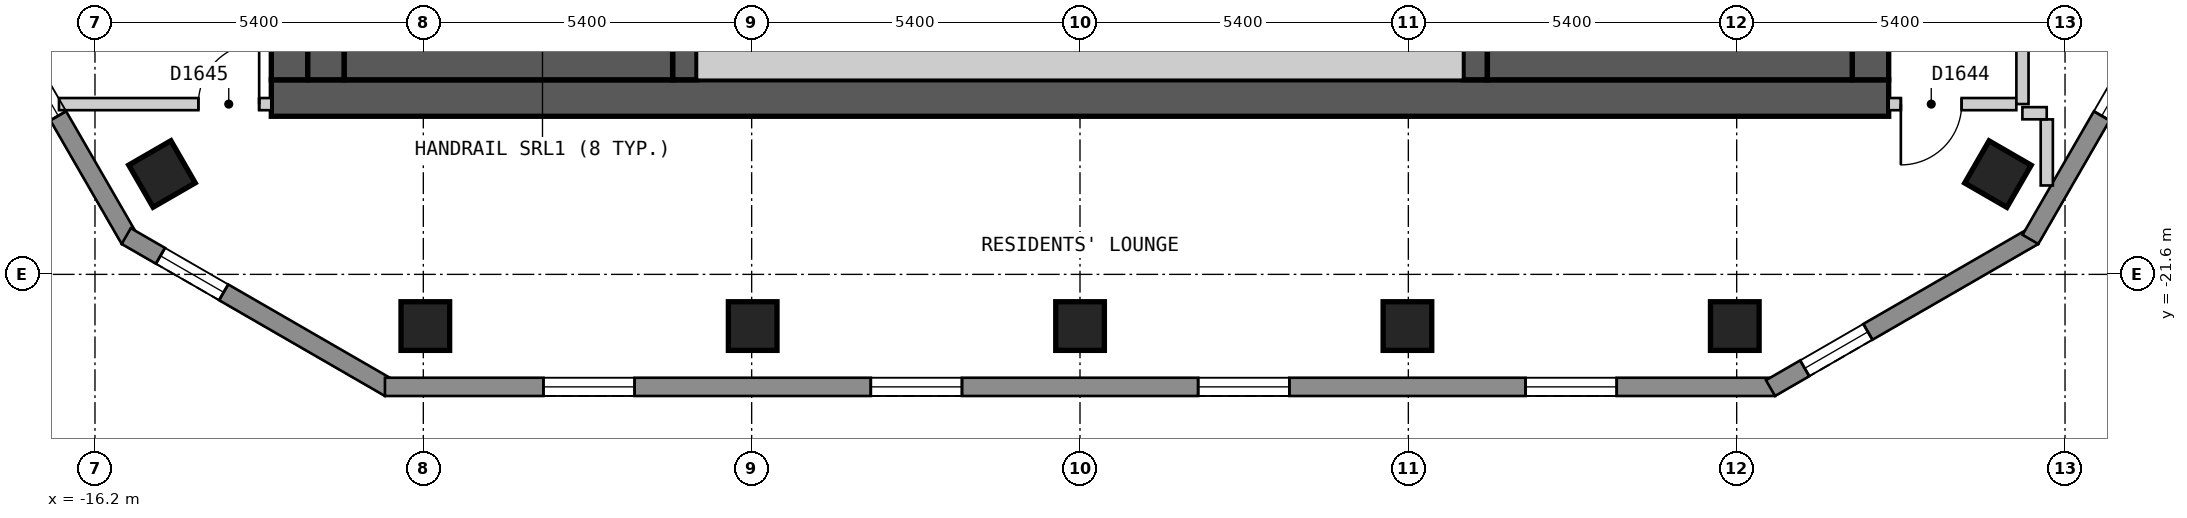
"""IFC4 building model, lengths in metres.
Left out: names, types, materials, properties, quantities, classifications, styles, units other than length and angle.
Written with IfcOpenShell. Run it as: python <this file> out.ifc"""

import sys

from ifc_helpers import new_model, si_unit, direction, frame, frame_2d, origin, origin_2d, place, context, subcontext, project, spatial, polyline, rectangle, outline, extrude, element, fill, save


model = new_model("IFC4")
c1 = context("Model", 3, precision=1e-05, world=origin(), true_north=direction((0.0, 1.0)))
c2 = subcontext(c1, "Body", "Model", "MODEL_VIEW")
j1 = project(units=[si_unit("LENGTHUNIT", "METRE"), si_unit("PLANEANGLEUNIT", "RADIAN")], contexts=[c1])
p1 = place(None, origin())
s1 = spatial("IfcSite", under=j1, at=p1, CompositionType="ELEMENT")
p2 = place(p1, origin())
s2 = spatial("IfcBuilding", under=s1, at=p2, CompositionType="ELEMENT")
p3 = place(p2, frame((0.0, 0.0, 169.2)))
s3 = spatial("IfcBuildingStorey", under=s2, at=p3, CompositionType="ELEMENT", Elevation=169.2)
for number, where, z_axis, x_axis in (
    (1, (-15.098, -19.949, 0.0), (0.0, 0.0, 1.0), (0.5, -0.866, 0.0)),
    (2, (-10.767, -22.45, 0.0), (0.0, 0.0, 1.0), (1.0, 0.0, 0.0)),
    (3, (-5.383, -22.45, 0.0), (0.0, 0.0, 1.0), (1.0, 0.0, 0.0)),
    (4, (0.001, -22.45, 0.0), (0.0, 0.0, 1.0), (1.0, 0.0, 0.0)),
    (5, (5.385, -22.45, 0.0), (0.0, 0.0, 1.0), (1.0, 0.0, 0.0)),
    (6, (10.769, -22.45, 0.0), (0.0, 0.0, 1.0), (1.0, 0.0, 0.0)),
    (7, (15.097, -19.951, 0.0), (0.0, 0.0, 1.0), (0.5, 0.866, 0.0)),
):
    element("IfcColumn", number, at=place(p3, frame(where, z_axis=z_axis, x_axis=x_axis)), inside=s3, PredefinedType="COLUMN", context=c2, shape_type="SweptSolid", body=[
        extrude(rectangle(XDim=0.8, YDim=0.8, at=origin_2d()), origin(), (0.0, 0.0, 1.0), 3.0),
    ])
p4 = place(p3, frame((-13.3, -18.7, 0.0), z_axis=(0.0, 0.0, 1.0), x_axis=(1.0, 0.0, 0.0)))
e8 = element("IfcWall", 8, at=p4, inside=s3, PredefinedType="SHEAR", context=c2, shape_type="SweptSolid", body=[
    extrude(rectangle(XDim=26.6, YDim=0.6, at=frame_2d((13.3, 0.0))), origin(), (0.0, 0.0, 1.0), 2.7),
])
p5 = place(p3, frame((-13.0, -18.4, 0.0), z_axis=(0.0, 0.0, 1.0), x_axis=(0.0, 1.0, 0.0)))
e9 = element("IfcWall", 9, at=p5, inside=s3, PredefinedType="SHEAR", context=c2, shape_type="SweptSolid", body=[
    extrude(rectangle(XDim=12.8, YDim=0.6, at=frame_2d((6.4, 0.0))), origin(), (0.0, 0.0, 1.0), 2.7),
])
p6 = place(p5, frame((4.2, 0.0, 0.0)))
e10 = element("IfcOpeningElement", 10, at=p6, cuts=e9, PredefinedType="OPENING", context=c2, shape_type="SweptSolid", body=[
    extrude(rectangle(XDim=1.2, YDim=2.1, at=frame_2d((0.6, 1.05))), frame((0.0, 0.31, 0.0), z_axis=(0.0, -1.0, 0.0), x_axis=(1.0, 0.0, 0.0)), (0.0, 0.0, 1.0), 0.62),
])
p7 = place(p3, frame((13.0, -18.4, 0.0), z_axis=(0.0, 0.0, 1.0), x_axis=(0.0, 1.0, 0.0)))
e11 = element("IfcWall", 11, at=p7, inside=s3, PredefinedType="SHEAR", context=c2, shape_type="SweptSolid", body=[
    extrude(rectangle(XDim=12.8, YDim=0.6, at=frame_2d((6.4, 0.0))), origin(), (0.0, 0.0, 1.0), 2.7),
])
for number, where, z_axis, x_axis in (
    (12, (-6.5, -18.4, 0.0), (0.0, 0.0, 1.0), (0.0, 1.0, 0.0)),
    (13, (6.5, -18.4, 0.0), (0.0, 0.0, 1.0), (0.0, 1.0, 0.0)),
):
    element("IfcWall", number, at=place(p3, frame(where, z_axis=z_axis, x_axis=x_axis)), inside=s3, PredefinedType="SHEAR", context=c2, shape_type="SweptSolid", body=[
        extrude(rectangle(XDim=3.55, YDim=0.4, at=frame_2d((1.775, 0.0))), origin(), (0.0, 0.0, 1.0), 2.7),
    ])
p8 = place(p3, frame((-26.024, -3.025, 0.0), z_axis=(0.0, 0.0, 1.0), x_axis=(0.500018670445, -0.86601462413, 0.0)))
e14 = element("IfcWall", 14, at=p8, inside=s3, PredefinedType="SOLIDWALL", context=c2, shape_type="SweptSolid", body=[
    extrude(outline(polyline([(0.0, -0.15), (20.785, -0.15), (20.705, 0.15), (0.08, 0.15), (0.0, -0.15)])), origin(), (0.0, 0.0, 1.0), 2.7),
])
p9 = place(p8, frame((2.346, 0.0, 0.15)))
e15 = element("IfcOpeningElement", 15, at=p9, cuts=e14, PredefinedType="OPENING", context=c2, shape_type="SweptSolid", body=[
    extrude(rectangle(XDim=1.5, YDim=2.1, at=frame_2d((0.75, 1.05))), frame((0.0, 0.16, 0.0), z_axis=(0.0, -1.0, 0.0), x_axis=(1.0, 0.0, 0.0)), (0.0, 0.0, 1.0), 0.32),
])
p10 = place(p8, frame((7.21, 0.0, 0.15)))
e16 = element("IfcOpeningElement", 16, at=p10, cuts=e14, PredefinedType="OPENING", context=c2, shape_type="SweptSolid", body=[
    extrude(rectangle(XDim=1.5, YDim=2.1, at=frame_2d((0.75, 1.05))), frame((0.0, 0.16, 0.0), z_axis=(0.0, -1.0, 0.0), x_axis=(1.0, 0.0, 0.0)), (0.0, 0.0, 1.0), 0.32),
])
p11 = place(p8, frame((12.073, 0.0, 0.15)))
e17 = element("IfcOpeningElement", 17, at=p11, cuts=e14, PredefinedType="OPENING", context=c2, shape_type="SweptSolid", body=[
    extrude(rectangle(XDim=1.5, YDim=2.1, at=frame_2d((0.75, 1.05))), frame((0.0, 0.16, 0.0), z_axis=(0.0, -1.0, 0.0), x_axis=(1.0, 0.0, 0.0)), (0.0, 0.0, 1.0), 0.32),
])
p12 = place(p8, frame((16.938, 0.0, 0.15)))
e18 = element("IfcOpeningElement", 18, at=p12, cuts=e14, PredefinedType="OPENING", context=c2, shape_type="SweptSolid", body=[
    extrude(rectangle(XDim=1.5, YDim=2.1, at=frame_2d((0.75, 1.05))), frame((0.0, 0.16, 0.0), z_axis=(0.0, -1.0, 0.0), x_axis=(1.0, 0.0, 0.0)), (0.0, 0.0, 1.0), 0.32),
])
p13 = place(p3, frame((-15.686, -20.97, 0.0), z_axis=(0.0, 0.0, 1.0), x_axis=(0.866022959057, -0.500004234368, 0.0)))
e19 = element("IfcWall", 19, at=p13, inside=s3, PredefinedType="SOLIDWALL", context=c2, shape_type="SweptSolid", body=[
    extrude(outline(polyline([(0.0, -0.15), (5.0, -0.15), (4.92, 0.15), (0.08, 0.15), (0.0, -0.15)])), origin(), (0.0, 0.0, 1.0), 2.7),
])
p14 = place(p13, frame((0.65, 0.0, 0.15)))
e20 = element("IfcOpeningElement", 20, at=p14, cuts=e19, PredefinedType="OPENING", context=c2, shape_type="SweptSolid", body=[
    extrude(rectangle(XDim=1.2, YDim=2.1, at=frame_2d((0.6, 1.05))), frame((0.0, 0.16, 0.0), z_axis=(0.0, -1.0, 0.0), x_axis=(1.0, 0.0, 0.0)), (0.0, 0.0, 1.0), 0.32),
])
p15 = place(p3, frame((-11.431, -23.45, 0.0), z_axis=(0.0, 0.0, 1.0), x_axis=(1.0, 0.0, 0.0)))
e21 = element("IfcWall", 21, at=p15, inside=s3, PredefinedType="SOLIDWALL", context=c2, shape_type="SweptSolid", body=[
    extrude(outline(polyline([(0.0, -0.15), (22.862, -0.15), (22.781, 0.15), (0.08, 0.15), (0.0, -0.15)])), origin(), (0.0, 0.0, 1.0), 2.7),
])
p16 = place(p15, frame((2.606, 0.0, 0.15)))
e22 = element("IfcOpeningElement", 22, at=p16, cuts=e21, PredefinedType="OPENING", context=c2, shape_type="SweptSolid", body=[
    extrude(rectangle(XDim=1.5, YDim=2.1, at=frame_2d((0.75, 1.05))), frame((0.0, 0.16, 0.0), z_axis=(0.0, -1.0, 0.0), x_axis=(1.0, 0.0, 0.0)), (0.0, 0.0, 1.0), 0.32),
])
p17 = place(p15, frame((7.99, 0.0, 0.15)))
e23 = element("IfcOpeningElement", 23, at=p17, cuts=e21, PredefinedType="OPENING", context=c2, shape_type="SweptSolid", body=[
    extrude(rectangle(XDim=1.5, YDim=2.1, at=frame_2d((0.75, 1.05))), frame((0.0, 0.16, 0.0), z_axis=(0.0, -1.0, 0.0), x_axis=(1.0, 0.0, 0.0)), (0.0, 0.0, 1.0), 0.32),
])
p18 = place(p15, frame((13.374, 0.0, 0.15)))
e24 = element("IfcOpeningElement", 24, at=p18, cuts=e21, PredefinedType="OPENING", context=c2, shape_type="SweptSolid", body=[
    extrude(rectangle(XDim=1.5, YDim=2.1, at=frame_2d((0.75, 1.05))), frame((0.0, 0.16, 0.0), z_axis=(0.0, -1.0, 0.0), x_axis=(1.0, 0.0, 0.0)), (0.0, 0.0, 1.0), 0.32),
])
p19 = place(p15, frame((18.758, 0.0, 0.15)))
e25 = element("IfcOpeningElement", 25, at=p19, cuts=e21, PredefinedType="OPENING", context=c2, shape_type="SweptSolid", body=[
    extrude(rectangle(XDim=1.5, YDim=2.1, at=frame_2d((0.75, 1.05))), frame((0.0, 0.16, 0.0), z_axis=(0.0, -1.0, 0.0), x_axis=(1.0, 0.0, 0.0)), (0.0, 0.0, 1.0), 0.32),
])
p20 = place(p3, frame((11.356, -23.47, 0.0), z_axis=(0.0, 0.0, 1.0), x_axis=(0.866022959057, 0.500004234368, 0.0)))
e26 = element("IfcWall", 26, at=p20, inside=s3, PredefinedType="SOLIDWALL", context=c2, shape_type="SweptSolid", body=[
    extrude(outline(polyline([(0.0, -0.15), (5.0, -0.15), (4.92, 0.15), (0.08, 0.15), (0.0, -0.15)])), origin(), (0.0, 0.0, 1.0), 2.7),
])
p21 = place(p20, frame((0.65, 0.0, 0.15)))
e27 = element("IfcOpeningElement", 27, at=p21, cuts=e26, PredefinedType="OPENING", context=c2, shape_type="SweptSolid", body=[
    extrude(rectangle(XDim=1.2, YDim=2.1, at=frame_2d((0.6, 1.05))), frame((0.0, 0.16, 0.0), z_axis=(0.0, -1.0, 0.0), x_axis=(1.0, 0.0, 0.0)), (0.0, 0.0, 1.0), 0.32),
])
p22 = place(p3, frame((15.631, -21.025, 0.0), z_axis=(0.0, 0.0, 1.0), x_axis=(0.500018670445, 0.86601462413, 0.0)))
e28 = element("IfcWall", 28, at=p22, inside=s3, PredefinedType="SOLIDWALL", context=c2, shape_type="SweptSolid", body=[
    extrude(outline(polyline([(0.0, -0.15), (20.785, -0.15), (20.705, 0.15), (0.08, 0.15), (0.0, -0.15)])), origin(), (0.0, 0.0, 1.0), 2.7),
])
p23 = place(p22, frame((2.346, 0.0, 0.15)))
e29 = element("IfcOpeningElement", 29, at=p23, cuts=e28, PredefinedType="OPENING", context=c2, shape_type="SweptSolid", body=[
    extrude(rectangle(XDim=1.5, YDim=2.1, at=frame_2d((0.75, 1.05))), frame((0.0, 0.16, 0.0), z_axis=(0.0, -1.0, 0.0), x_axis=(1.0, 0.0, 0.0)), (0.0, 0.0, 1.0), 0.32),
])
p24 = place(p22, frame((7.21, 0.0, 0.15)))
e30 = element("IfcOpeningElement", 30, at=p24, cuts=e28, PredefinedType="OPENING", context=c2, shape_type="SweptSolid", body=[
    extrude(rectangle(XDim=1.5, YDim=2.1, at=frame_2d((0.75, 1.05))), frame((0.0, 0.16, 0.0), z_axis=(0.0, -1.0, 0.0), x_axis=(1.0, 0.0, 0.0)), (0.0, 0.0, 1.0), 0.32),
])
p25 = place(p22, frame((12.073, 0.0, 0.15)))
e31 = element("IfcOpeningElement", 31, at=p25, cuts=e28, PredefinedType="OPENING", context=c2, shape_type="SweptSolid", body=[
    extrude(rectangle(XDim=1.5, YDim=2.1, at=frame_2d((0.75, 1.05))), frame((0.0, 0.16, 0.0), z_axis=(0.0, -1.0, 0.0), x_axis=(1.0, 0.0, 0.0)), (0.0, 0.0, 1.0), 0.32),
])
p26 = place(p22, frame((16.938, 0.0, 0.15)))
e32 = element("IfcOpeningElement", 32, at=p26, cuts=e28, PredefinedType="OPENING", context=c2, shape_type="SweptSolid", body=[
    extrude(rectangle(XDim=1.5, YDim=2.1, at=frame_2d((0.75, 1.05))), frame((0.0, 0.16, 0.0), z_axis=(0.0, -1.0, 0.0), x_axis=(1.0, 0.0, 0.0)), (0.0, 0.0, 1.0), 0.32),
])
p27 = place(p3, frame((13.3, -18.8, 0.0), z_axis=(0.0, 0.0, 1.0), x_axis=(1.0, 0.0, 0.0)))
e33 = element("IfcWall", 33, at=p27, inside=s3, PredefinedType="PARTITIONING", context=c2, shape_type="SweptSolid", body=[
    extrude(rectangle(XDim=2.099, YDim=0.2, at=frame_2d((1.049, 0.0))), origin(), (0.0, 0.0, 1.0), 2.7),
])
p28 = place(p27, frame((0.2, 0.0, 0.0)))
e34 = element("IfcOpeningElement", 34, at=p28, cuts=e33, PredefinedType="OPENING", context=c2, shape_type="SweptSolid", body=[
    extrude(rectangle(XDim=1.0, YDim=2.1, at=frame_2d((0.5, 1.05))), frame((0.0, 0.11, 0.0), z_axis=(0.0, -1.0, 0.0), x_axis=(1.0, 0.0, 0.0)), (0.0, 0.0, 1.0), 0.22),
])
p29 = place(p3, frame((15.5, -18.799, 0.0), z_axis=(0.0, 0.0, 1.0), x_axis=(0.0, 1.0, 0.0)))
e35 = element("IfcWall", 35, at=p29, inside=s3, PredefinedType="PARTITIONING", context=c2, shape_type="SweptSolid", body=[
    extrude(rectangle(XDim=15.349, YDim=0.2, at=frame_2d((7.675, 0.0))), origin(), (0.0, 0.0, 1.0), 2.7),
])
p30 = place(p29, frame((4.477, 0.0, 0.0)))
e36 = element("IfcOpeningElement", 36, at=p30, cuts=e35, PredefinedType="OPENING", context=c2, shape_type="SweptSolid", body=[
    extrude(rectangle(XDim=0.8, YDim=2.1, at=frame_2d((0.4, 1.05))), frame((0.0, 0.11, 0.0), z_axis=(0.0, -1.0, 0.0), x_axis=(1.0, 0.0, 0.0)), (0.0, 0.0, 1.0), 0.22),
])
p31 = place(p29, frame((11.348, 0.0, 0.0)))
e37 = element("IfcOpeningElement", 37, at=p31, cuts=e35, PredefinedType="OPENING", context=c2, shape_type="SweptSolid", body=[
    extrude(rectangle(XDim=1.0, YDim=2.1, at=frame_2d((0.5, 1.05))), frame((0.0, 0.11, 0.0), z_axis=(0.0, -1.0, 0.0), x_axis=(1.0, 0.0, 0.0)), (0.0, 0.0, 1.0), 0.22),
])
p32 = place(p3, frame((15.9, -19.051, 0.0), z_axis=(0.0, 0.0, 1.0), x_axis=(0.0, -1.0, 0.0)))
e38 = element("IfcWall", 38, at=p32, inside=s3, PredefinedType="PARTITIONING", context=c2, shape_type="SweptSolid", body=[
    extrude(rectangle(XDim=1.087, YDim=0.2, at=frame_2d((0.543, 0.0))), origin(), (0.0, 0.0, 1.0), 2.7),
])
p33 = place(p3, frame((15.499, -18.95, 0.0), z_axis=(0.0, 0.0, 1.0), x_axis=(1.0, 0.0, 0.0)))
e39 = element("IfcWall", 39, at=p33, inside=s3, PredefinedType="PARTITIONING", context=c2, shape_type="SweptSolid", body=[
    extrude(rectangle(XDim=0.4, YDim=0.2, at=frame_2d((0.2, 0.0))), origin(), (0.0, 0.0, 1.0), 2.7),
])
p34 = place(p3, frame((-16.792, -18.8, 0.0), z_axis=(0.0, 0.0, 1.0), x_axis=(1.0, 0.0, 0.0)))
e40 = element("IfcWall", 40, at=p34, inside=s3, PredefinedType="PARTITIONING", context=c2, shape_type="SweptSolid", body=[
    extrude(rectangle(XDim=3.492, YDim=0.2, at=frame_2d((1.746, 0.0))), origin(), (0.0, 0.0, 1.0), 2.7),
])
p35 = place(p34, frame((2.292, 0.0, 0.0)))
e41 = element("IfcOpeningElement", 41, at=p35, cuts=e40, PredefinedType="OPENING", context=c2, shape_type="SweptSolid", body=[
    extrude(rectangle(XDim=1.0, YDim=2.1, at=frame_2d((0.5, 1.05))), frame((0.0, 0.11, 0.0), z_axis=(0.0, -1.0, 0.0), x_axis=(1.0, 0.0, 0.0)), (0.0, 0.0, 1.0), 0.22),
])
p36 = place(p3, frame((-12.4, -18.4, 0.0), z_axis=(0.0, 0.0, 1.0), x_axis=(0.0, 1.0, 0.0)))
e42 = element("IfcWall", 42, at=p36, inside=s3, PredefinedType="SOLIDWALL", context=c2, shape_type="SweptSolid", body=[
    extrude(rectangle(XDim=3.55, YDim=0.6, at=frame_2d((1.775, 0.0))), origin(), (0.0, 0.0, 1.0), 2.7),
])
p37 = place(p3, frame((-12.1, -18.1, 0.0), z_axis=(0.0, 0.0, 1.0), x_axis=(1.0, 0.0, 0.0)))
e43 = element("IfcWall", 43, at=p37, inside=s3, PredefinedType="SOLIDWALL", context=c2, shape_type="SweptSolid", body=[
    extrude(rectangle(XDim=5.4, YDim=0.6, at=frame_2d((2.7, 0.0))), origin(), (0.0, 0.0, 1.0), 2.7),
])
p38 = place(p3, frame((-6.3, -18.1, 0.0), z_axis=(0.0, 0.0, 1.0), x_axis=(1.0, 0.0, 0.0)))
e44 = element("IfcWall", 44, at=p38, inside=s3, PredefinedType="PARTITIONING", context=c2, shape_type="SweptSolid", body=[
    extrude(rectangle(XDim=12.6, YDim=0.6, at=frame_2d((6.3, 0.0))), origin(), (0.0, 0.0, 1.0), 2.7),
])
p39 = place(p3, frame((6.7, -18.0, 0.0), z_axis=(0.0, 0.0, 1.0), x_axis=(1.0, 0.0, 0.0)))
e45 = element("IfcWall", 45, at=p39, inside=s3, PredefinedType="SOLIDWALL", context=c2, shape_type="SweptSolid", body=[
    extrude(rectangle(XDim=6.0, YDim=0.8, at=frame_2d((3.0, 0.0))), origin(), (0.0, 0.0, 1.0), 2.7),
])
p40 = place(p12, origin())
e46 = element("IfcWindow", 46, at=p40, inside=s3, PartitioningType="SINGLE_PANEL", PredefinedType="WINDOW", context=c2, shape_type="SweptSolid", body=[
    extrude(rectangle(XDim=1.5, YDim=2.1, at=frame_2d((0.75, 1.05))), frame((0.0, 0.03, 0.0), z_axis=(0.0, -1.0, 0.0), x_axis=(1.0, 0.0, 0.0)), (0.0, 0.0, 1.0), 0.06),
])
fill(e18, e46)
p41 = place(p14, origin())
e47 = element("IfcWindow", 47, at=p41, inside=s3, PartitioningType="SINGLE_PANEL", PredefinedType="WINDOW", context=c2, shape_type="SweptSolid", body=[
    extrude(rectangle(XDim=1.2, YDim=2.1, at=frame_2d((0.6, 1.05))), frame((0.0, 0.03, 0.0), z_axis=(0.0, -1.0, 0.0), x_axis=(1.0, 0.0, 0.0)), (0.0, 0.0, 1.0), 0.06),
])
fill(e20, e47)
p42 = place(p16, origin())
e48 = element("IfcWindow", 48, at=p42, inside=s3, PartitioningType="SINGLE_PANEL", PredefinedType="WINDOW", context=c2, shape_type="SweptSolid", body=[
    extrude(rectangle(XDim=1.5, YDim=2.1, at=frame_2d((0.75, 1.05))), frame((0.0, 0.03, 0.0), z_axis=(0.0, -1.0, 0.0), x_axis=(1.0, 0.0, 0.0)), (0.0, 0.0, 1.0), 0.06),
])
fill(e22, e48)
p43 = place(p17, origin())
e49 = element("IfcWindow", 49, at=p43, inside=s3, PartitioningType="SINGLE_PANEL", PredefinedType="WINDOW", context=c2, shape_type="SweptSolid", body=[
    extrude(rectangle(XDim=1.5, YDim=2.1, at=frame_2d((0.75, 1.05))), frame((0.0, 0.03, 0.0), z_axis=(0.0, -1.0, 0.0), x_axis=(1.0, 0.0, 0.0)), (0.0, 0.0, 1.0), 0.06),
])
fill(e23, e49)
p44 = place(p18, origin())
e50 = element("IfcWindow", 50, at=p44, inside=s3, PartitioningType="SINGLE_PANEL", PredefinedType="WINDOW", context=c2, shape_type="SweptSolid", body=[
    extrude(rectangle(XDim=1.5, YDim=2.1, at=frame_2d((0.75, 1.05))), frame((0.0, 0.03, 0.0), z_axis=(0.0, -1.0, 0.0), x_axis=(1.0, 0.0, 0.0)), (0.0, 0.0, 1.0), 0.06),
])
fill(e24, e50)
p45 = place(p19, origin())
e51 = element("IfcWindow", 51, at=p45, inside=s3, PartitioningType="SINGLE_PANEL", PredefinedType="WINDOW", context=c2, shape_type="SweptSolid", body=[
    extrude(rectangle(XDim=1.5, YDim=2.1, at=frame_2d((0.75, 1.05))), frame((0.0, 0.03, 0.0), z_axis=(0.0, -1.0, 0.0), x_axis=(1.0, 0.0, 0.0)), (0.0, 0.0, 1.0), 0.06),
])
fill(e25, e51)
p46 = place(p21, origin())
e52 = element("IfcWindow", 52, at=p46, inside=s3, PartitioningType="SINGLE_PANEL", PredefinedType="WINDOW", context=c2, shape_type="SweptSolid", body=[
    extrude(rectangle(XDim=1.2, YDim=2.1, at=frame_2d((0.6, 1.05))), frame((0.0, 0.03, 0.0), z_axis=(0.0, -1.0, 0.0), x_axis=(1.0, 0.0, 0.0)), (0.0, 0.0, 1.0), 0.06),
])
fill(e27, e52)
p47 = place(p23, origin())
e53 = element("IfcWindow", 53, at=p47, inside=s3, PartitioningType="SINGLE_PANEL", PredefinedType="WINDOW", context=c2, shape_type="SweptSolid", body=[
    extrude(rectangle(XDim=1.5, YDim=2.1, at=frame_2d((0.75, 1.05))), frame((0.0, 0.03, 0.0), z_axis=(0.0, -1.0, 0.0), x_axis=(1.0, 0.0, 0.0)), (0.0, 0.0, 1.0), 0.06),
])
fill(e29, e53)
p48 = place(p28, origin())
e54 = element("IfcDoor", 54, at=p48, inside=s3, OperationType="SINGLE_SWING_LEFT", PredefinedType="DOOR", context=c2, shape_type="SweptSolid", body=[
    extrude(rectangle(XDim=1.0, YDim=2.1, at=frame_2d((0.5, 1.05))), frame((0.0, 0.025, 0.0), z_axis=(0.0, -1.0, 0.0), x_axis=(1.0, 0.0, 0.0)), (0.0, 0.0, 1.0), 0.05),
])
fill(e34, e54)
p49 = place(p35, origin())
e55 = element("IfcDoor", 55, at=p49, inside=s3, OperationType="SINGLE_SWING_RIGHT", PredefinedType="DOOR", context=c2, shape_type="SweptSolid", body=[
    extrude(rectangle(XDim=1.0, YDim=2.1, at=frame_2d((0.5, 1.05))), frame((0.0, 0.025, 0.0), z_axis=(0.0, -1.0, 0.0), x_axis=(1.0, 0.0, 0.0)), (0.0, 0.0, 1.0), 0.05),
])
fill(e41, e55)
save(model, sys.argv[1])
